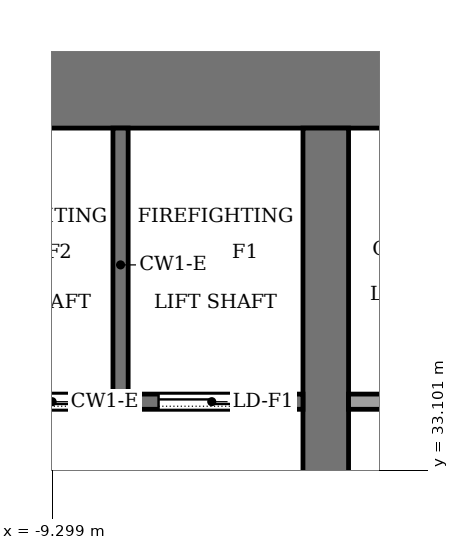
"""IFC4 building model, lengths in metres.
Left out: names, types, materials, properties, quantities, classifications, styles, units other than length and angle.
Written with IfcOpenShell. Run it as: python <this file> out.ifc"""

import sys

from ifc_helpers import new_model, si_unit, direction, frame, frame_2d, origin, place, context, subcontext, project, spatial, rectangle, extrude, element, fill, save


model = new_model("IFC4")
c1 = context("Model", 3, precision=1e-05, world=origin(), true_north=direction((0.0, 1.0)))
c2 = subcontext(c1, "Body", "Model", "MODEL_VIEW")
j1 = project(units=[si_unit("LENGTHUNIT", "METRE"), si_unit("PLANEANGLEUNIT", "RADIAN")], contexts=[c1])
p1 = place(None, origin())
s1 = spatial("IfcSite", under=j1, at=p1, CompositionType="ELEMENT")
p2 = place(p1, origin())
s2 = spatial("IfcBuilding", under=s1, at=p2, CompositionType="ELEMENT")
p3 = place(p2, frame((0.0, 0.0, 65.0)))
s3 = spatial("IfcBuildingStorey", under=s2, at=p3, CompositionType="ELEMENT", Elevation=65.0)
p4 = place(p3, frame((-13.8, 38.2, -0.13), z_axis=(0.0, 0.0, 1.0), x_axis=(1.0, 0.0, 0.0)))
e1 = element("IfcWall", 1, at=p4, inside=s3, PredefinedType="SHEAR", context=c2, shape_type="SweptSolid", body=[
    extrude(rectangle(XDim=27.6, YDim=1.2, at=frame_2d((13.8, 0.0))), origin(), (0.0, 0.0, 1.0), 5.0),
])
p5 = place(p3, frame((-5.7, 18.4, -0.13), z_axis=(0.0, 0.0, 1.0), x_axis=(0.0, 1.0, 0.0)))
e2 = element("IfcWall", 2, at=p5, inside=s3, PredefinedType="SHEAR", context=c2, shape_type="SweptSolid", body=[
    extrude(rectangle(XDim=19.2, YDim=0.6, at=frame_2d((9.6, 0.0))), origin(), (0.0, 0.0, 1.0), 5.0),
])
p6 = place(p5, frame((8.35, 0.0, 0.13)))
e3 = element("IfcOpeningElement", 3, at=p6, cuts=e2, PredefinedType="OPENING", context=c2, shape_type="SweptSolid", body=[
    extrude(rectangle(XDim=0.9, YDim=2.1, at=frame_2d((0.45, 1.05))), frame((0.0, 0.31, 0.0), z_axis=(0.0, -1.0, 0.0), x_axis=(1.0, 0.0, 0.0)), (0.0, 0.0, 1.0), 0.62),
])
p7 = place(p3, frame((-12.6, 34.0, 0.0), z_axis=(0.0, 0.0, 1.0), x_axis=(1.0, 0.0, 0.0)))
e4 = element("IfcWall", 4, at=p7, inside=s3, PredefinedType="PARTITIONING", context=c2, shape_type="SweptSolid", body=[
    extrude(rectangle(XDim=6.6, YDim=0.2, at=frame_2d((3.3, 0.0))), origin(), (0.0, 0.0, 1.0), 4.87),
])
p8 = place(p7, frame((4.7, 0.0, 0.0)))
e5 = element("IfcOpeningElement", 5, at=p8, cuts=e4, PredefinedType="OPENING", context=c2, shape_type="SweptSolid", body=[
    extrude(rectangle(XDim=1.4, YDim=2.2, at=frame_2d((0.7, 1.1))), frame((0.0, 0.11, 0.0), z_axis=(0.0, -1.0, 0.0), x_axis=(1.0, 0.0, 0.0)), (0.0, 0.0, 1.0), 0.22),
])
p9 = place(p7, frame((2.3, 0.0, 0.0)))
e6 = element("IfcOpeningElement", 6, at=p9, cuts=e4, PredefinedType="OPENING", context=c2, shape_type="SweptSolid", body=[
    extrude(rectangle(XDim=1.4, YDim=2.2, at=frame_2d((0.7, 1.1))), frame((0.0, 0.11, 0.0), z_axis=(0.0, -1.0, 0.0), x_axis=(1.0, 0.0, 0.0)), (0.0, 0.0, 1.0), 0.22),
])
p10 = place(p7, frame((0.45, 0.0, 0.0)))
e7 = element("IfcOpeningElement", 7, at=p10, cuts=e4, PredefinedType="OPENING", context=c2, shape_type="SweptSolid", body=[
    extrude(rectangle(XDim=0.9, YDim=2.1, at=frame_2d((0.45, 1.05))), frame((0.0, 0.11, 0.0), z_axis=(0.0, -1.0, 0.0), x_axis=(1.0, 0.0, 0.0)), (0.0, 0.0, 1.0), 0.22),
])
p11 = place(p3, frame((-5.4, 34.0, 0.0), z_axis=(0.0, 0.0, 1.0), x_axis=(1.0, 0.0, 0.0)))
e8 = element("IfcWall", 8, at=p11, inside=s3, PredefinedType="PARTITIONING", context=c2, shape_type="SweptSolid", body=[
    extrude(rectangle(XDim=10.8, YDim=0.2, at=frame_2d((5.4, 0.0))), origin(), (0.0, 0.0, 1.0), 4.87),
])
p12 = place(p11, frame((6.15, 0.0, 0.0)))
e9 = element("IfcOpeningElement", 9, at=p12, cuts=e8, PredefinedType="OPENING", context=c2, shape_type="SweptSolid", body=[
    extrude(rectangle(XDim=1.2, YDim=2.2, at=frame_2d((0.6, 1.1))), frame((0.0, 0.11, 0.0), z_axis=(0.0, -1.0, 0.0), x_axis=(1.0, 0.0, 0.0)), (0.0, 0.0, 1.0), 0.22),
])
p13 = place(p11, frame((8.95, 0.0, 0.0)))
e10 = element("IfcOpeningElement", 10, at=p13, cuts=e8, PredefinedType="OPENING", context=c2, shape_type="SweptSolid", body=[
    extrude(rectangle(XDim=1.0, YDim=2.1, at=frame_2d((0.5, 1.05))), frame((0.0, 0.11, 0.0), z_axis=(0.0, -1.0, 0.0), x_axis=(1.0, 0.0, 0.0)), (0.0, 0.0, 1.0), 0.22),
])
p14 = place(p3, frame((-8.4, 34.0, 0.0), z_axis=(0.0, 0.0, 1.0), x_axis=(0.0, 1.0, 0.0)))
e11 = element("IfcWall", 11, at=p14, inside=s3, PredefinedType="PARTITIONING", context=c2, shape_type="SweptSolid", body=[
    extrude(rectangle(XDim=3.6, YDim=0.2, at=frame_2d((1.8, 0.0))), origin(), (0.0, 0.0, 1.0), 4.87),
])
p15 = place(p8, origin())
e12 = element("IfcDoor", 12, at=p15, inside=s3, OperationType="SLIDING_TO_LEFT", PredefinedType="DOOR", context=c2, shape_type="SweptSolid", body=[
    extrude(rectangle(XDim=1.4, YDim=2.2, at=frame_2d((0.7, 1.1))), frame((0.0, 0.025, 0.0), z_axis=(0.0, -1.0, 0.0), x_axis=(1.0, 0.0, 0.0)), (0.0, 0.0, 1.0), 0.05),
])
fill(e5, e12)
p16 = place(p9, origin())
e13 = element("IfcDoor", 13, at=p16, inside=s3, OperationType="SLIDING_TO_LEFT", PredefinedType="DOOR", context=c2, shape_type="SweptSolid", body=[
    extrude(rectangle(XDim=1.4, YDim=2.2, at=frame_2d((0.7, 1.1))), frame((0.0, 0.025, 0.0), z_axis=(0.0, -1.0, 0.0), x_axis=(1.0, 0.0, 0.0)), (0.0, 0.0, 1.0), 0.05),
])
fill(e6, e13)
save(model, sys.argv[1])
